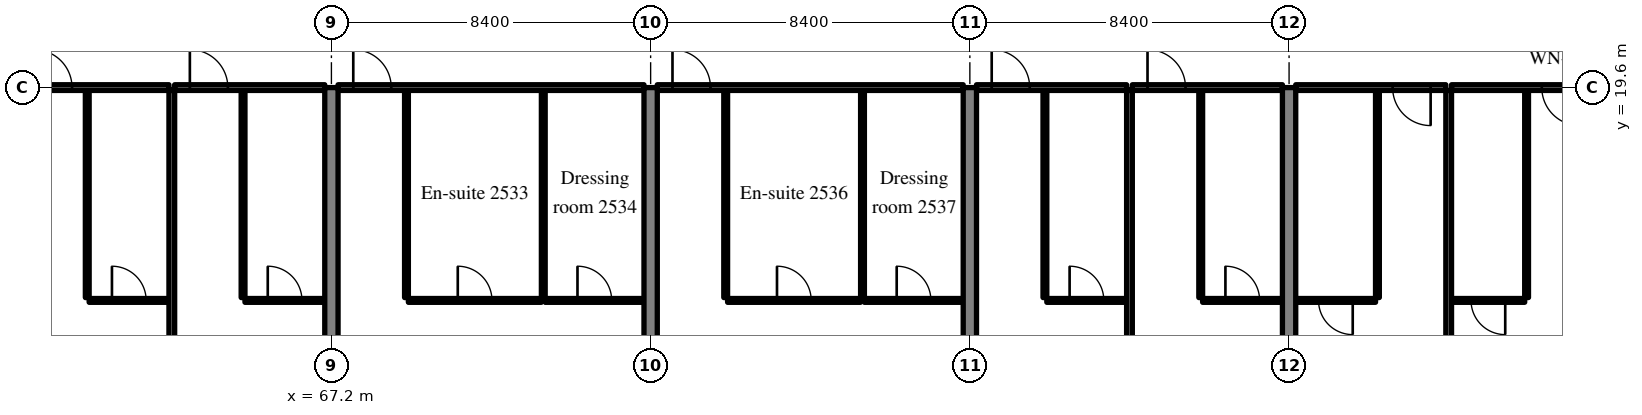
"""IFC4 building model, lengths in metres.
Left out: names, types, materials, properties, quantities, classifications, styles, units other than length and angle.
Written with IfcOpenShell. Run it as: python <this file> out.ifc"""

import sys

from ifc_helpers import new_model, si_unit, direction, frame, frame_2d, origin, place, context, subcontext, project, spatial, rectangle, extrude, source, transform, mapped, element, fill, save


model = new_model("IFC4")
c1 = context("Model", 3, precision=1e-05, world=origin(), true_north=direction((0.0, 1.0)))
c2 = subcontext(c1, "Body", "Model", "MODEL_VIEW")
j1 = project(units=[si_unit("LENGTHUNIT", "METRE"), si_unit("PLANEANGLEUNIT", "RADIAN")], contexts=[c1])
p1 = place(None, origin())
s1 = spatial("IfcSite", under=j1, at=p1, CompositionType="ELEMENT")
p2 = place(p1, origin())
s2 = spatial("IfcBuilding", under=s1, at=p2, CompositionType="ELEMENT")
p3 = place(p2, frame((0.0, 0.0, 106.6)))
s3 = spatial("IfcBuildingStorey", under=s2, at=p3, CompositionType="ELEMENT", Elevation=106.6)
m1 = source(origin(), c2, "Body", "SweptSolid", [
    extrude(rectangle(XDim=14.1, YDim=0.35, at=frame_2d((7.05, 0.0))), origin(), (0.0, 0.0, 1.0), 3.52),
])
for number, where, z_axis, x_axis in (
    (1, (67.2, 5.5, 0.0), (0.0, 0.0, 1.0), (0.0, 1.0, 0.0)),
    (2, (75.6, 5.5, 0.0), (0.0, 0.0, 1.0), (0.0, 1.0, 0.0)),
    (3, (84.0, 5.5, 0.0), (0.0, 0.0, 1.0), (0.0, 1.0, 0.0)),
    (4, (92.4, 5.5, 0.0), (0.0, 0.0, 1.0), (0.0, 1.0, 0.0)),
):
    element("IfcWall", number, at=place(p3, frame(where, z_axis=z_axis, x_axis=x_axis)), inside=s3, PredefinedType="SHEAR", context=c2, shape_type="MappedRepresentation", body=[
        mapped(m1, transform((0.0, 0.0, 0.0), scale=1.0)),
    ])
m2 = source(origin(), c2, "Body", "SweptSolid", [
    extrude(rectangle(XDim=5.45, YDim=0.1, at=frame_2d((2.725, 0.0))), origin(), (0.0, 0.0, 1.0), 3.52),
])
p4 = place(p3, frame((60.775, 14.075, 0.0), z_axis=(0.0, 0.0, 1.0), x_axis=(0.0, 1.0, 0.0)))
e5 = element("IfcWall", 5, at=p4, inside=s3, PredefinedType="PARTITIONING", context=c2, shape_type="MappedRepresentation", body=[
    mapped(m2, transform((0.0, 0.0, 0.0), scale=1.0)),
])
m3 = source(origin(), c2, "Body", "SweptSolid", [
    extrude(rectangle(XDim=2.1, YDim=0.1, at=frame_2d((1.05, 0.0))), origin(), (0.0, 0.0, 1.0), 3.52),
])
p5 = place(p3, frame((60.825, 14.0, 0.0), z_axis=(0.0, 0.0, 1.0), x_axis=(1.0, 0.0, 0.0)))
e6 = element("IfcWall", 6, at=p5, inside=s3, PredefinedType="PARTITIONING", context=c2, shape_type="MappedRepresentation", body=[
    mapped(m3, transform((0.0, 0.0, 0.0), scale=1.0)),
])
m4 = source(origin(), c2, "Body", "SweptSolid", [
    extrude(rectangle(XDim=0.9, YDim=2.1, at=frame_2d((0.45, 1.05))), frame((0.0, 0.06, 0.0), z_axis=(0.0, -1.0, 0.0), x_axis=(1.0, 0.0, 0.0)), (0.0, 0.0, 1.0), 0.12),
])
p6 = place(p5, frame((0.6, 0.0, 0.0)))
e7 = element("IfcOpeningElement", 7, at=p6, cuts=e6, PredefinedType="OPENING", context=c2, shape_type="MappedRepresentation", body=[
    mapped(m4, transform((0.0, 0.0, 0.0), scale=1.0)),
])
m5 = source(origin(), c2, "Body", "SweptSolid", [
    extrude(rectangle(XDim=3.95, YDim=0.15, at=frame_2d((1.975, 0.0))), origin(), (0.0, 0.0, 1.0), 2.82),
])
p7 = place(p3, frame((58.975, 19.6, 0.0), z_axis=(0.0, 0.0, 1.0), x_axis=(1.0, 0.0, 0.0)))
e8 = element("IfcWall", 8, at=p7, inside=s3, PredefinedType="PARTITIONING", context=c2, shape_type="MappedRepresentation", body=[
    mapped(m5, transform((0.0, 0.0, 0.0), scale=1.0)),
])
m6 = source(origin(), c2, "Body", "SweptSolid", [
    extrude(rectangle(XDim=1.0, YDim=2.1, at=frame_2d((0.5, 1.05))), frame((0.0, 0.085, 0.0), z_axis=(0.0, -1.0, 0.0), x_axis=(1.0, 0.0, 0.0)), (0.0, 0.0, 1.0), 0.17),
])
p8 = place(p7, frame((0.4, 0.0, 0.0)))
e9 = element("IfcOpeningElement", 9, at=p8, cuts=e8, PredefinedType="OPENING", context=c2, shape_type="MappedRepresentation", body=[
    mapped(m6, transform((0.0, 0.0, 0.0), scale=1.0)),
])
p9 = place(p3, frame((64.875, 14.075, 0.0), z_axis=(0.0, 0.0, 1.0), x_axis=(0.0, 1.0, 0.0)))
e10 = element("IfcWall", 10, at=p9, inside=s3, PredefinedType="PARTITIONING", context=c2, shape_type="MappedRepresentation", body=[
    mapped(m2, transform((0.0, 0.0, 0.0), scale=1.0)),
])
m7 = source(origin(), c2, "Body", "SweptSolid", [
    extrude(rectangle(XDim=2.1, YDim=0.1, at=frame_2d((1.05, 0.0))), origin(), (0.0, 0.0, 1.0), 3.52),
])
p10 = place(p3, frame((64.925, 14.0, 0.0), z_axis=(0.0, 0.0, 1.0), x_axis=(1.0, 0.0, 0.0)))
e11 = element("IfcWall", 11, at=p10, inside=s3, PredefinedType="PARTITIONING", context=c2, shape_type="MappedRepresentation", body=[
    mapped(m7, transform((0.0, 0.0, 0.0), scale=1.0)),
])
p11 = place(p10, frame((0.6, 0.0, 0.0)))
e12 = element("IfcOpeningElement", 12, at=p11, cuts=e11, PredefinedType="OPENING", context=c2, shape_type="MappedRepresentation", body=[
    mapped(m4, transform((0.0, 0.0, 0.0), scale=1.0)),
])
p12 = place(p3, frame((63.075, 19.6, 0.0), z_axis=(0.0, 0.0, 1.0), x_axis=(1.0, 0.0, 0.0)))
e13 = element("IfcWall", 13, at=p12, inside=s3, PredefinedType="PARTITIONING", context=c2, shape_type="MappedRepresentation", body=[
    mapped(m5, transform((0.0, 0.0, 0.0), scale=1.0)),
])
p13 = place(p12, frame((0.4, 0.0, 0.0)))
e14 = element("IfcOpeningElement", 14, at=p13, cuts=e13, PredefinedType="OPENING", context=c2, shape_type="MappedRepresentation", body=[
    mapped(m6, transform((0.0, 0.0, 0.0), scale=1.0)),
])
m8 = source(origin(), c2, "Body", "SweptSolid", [
    extrude(rectangle(XDim=15.498, YDim=0.15, at=frame_2d((7.749, 0.0))), origin(), (0.0, 0.0, 1.0), 3.52),
])
p14 = place(p3, frame((63.0, 4.027, 0.0), z_axis=(0.0, 0.0, 1.0), x_axis=(0.0, 1.0, 0.0)))
e15 = element("IfcWall", 15, at=p14, inside=s3, PredefinedType="PARTITIONING", context=c2, shape_type="MappedRepresentation", body=[
    mapped(m8, transform((0.0, 0.0, 0.0), scale=1.0)),
])
for number, where, z_axis, x_axis in (
    (16, (69.175, 14.075, 0.0), (0.0, 0.0, 1.0), (0.0, 1.0, 0.0)),
    (17, (72.775, 14.075, 0.0), (0.0, 0.0, 1.0), (0.0, 1.0, 0.0)),
):
    element("IfcWall", number, at=place(p3, frame(where, z_axis=z_axis, x_axis=x_axis)), inside=s3, PredefinedType="PARTITIONING", context=c2, shape_type="MappedRepresentation", body=[
        mapped(m2, transform((0.0, 0.0, 0.0), scale=1.0)),
    ])
m9 = source(origin(), c2, "Body", "SweptSolid", [
    extrude(rectangle(XDim=3.5, YDim=0.1, at=frame_2d((1.75, 0.0))), origin(), (0.0, 0.0, 1.0), 3.52),
])
p15 = place(p3, frame((69.225, 14.0, 0.0), z_axis=(0.0, 0.0, 1.0), x_axis=(1.0, 0.0, 0.0)))
e18 = element("IfcWall", 18, at=p15, inside=s3, PredefinedType="PARTITIONING", context=c2, shape_type="MappedRepresentation", body=[
    mapped(m9, transform((0.0, 0.0, 0.0), scale=1.0)),
])
p16 = place(p15, frame((1.3, 0.0, 0.0)))
e19 = element("IfcOpeningElement", 19, at=p16, cuts=e18, PredefinedType="OPENING", context=c2, shape_type="MappedRepresentation", body=[
    mapped(m4, transform((0.0, 0.0, 0.0), scale=1.0)),
])
m10 = source(origin(), c2, "Body", "SweptSolid", [
    extrude(rectangle(XDim=2.6, YDim=0.1, at=frame_2d((1.3, 0.0))), origin(), (0.0, 0.0, 1.0), 3.52),
])
p17 = place(p3, frame((72.825, 14.0, 0.0), z_axis=(0.0, 0.0, 1.0), x_axis=(1.0, 0.0, 0.0)))
e20 = element("IfcWall", 20, at=p17, inside=s3, PredefinedType="PARTITIONING", context=c2, shape_type="MappedRepresentation", body=[
    mapped(m10, transform((0.0, 0.0, 0.0), scale=1.0)),
])
p18 = place(p17, frame((0.85, 0.0, 0.0)))
e21 = element("IfcOpeningElement", 21, at=p18, cuts=e20, PredefinedType="OPENING", context=c2, shape_type="MappedRepresentation", body=[
    mapped(m4, transform((0.0, 0.0, 0.0), scale=1.0)),
])
m11 = source(origin(), c2, "Body", "SweptSolid", [
    extrude(rectangle(XDim=8.05, YDim=0.15, at=frame_2d((4.025, 0.0))), origin(), (0.0, 0.0, 1.0), 2.82),
])
p19 = place(p3, frame((67.375, 19.6, 0.0), z_axis=(0.0, 0.0, 1.0), x_axis=(1.0, 0.0, 0.0)))
e22 = element("IfcWall", 22, at=p19, inside=s3, PredefinedType="PARTITIONING", context=c2, shape_type="MappedRepresentation", body=[
    mapped(m11, transform((0.0, 0.0, 0.0), scale=1.0)),
])
p20 = place(p19, frame((0.4, 0.0, 0.0)))
e23 = element("IfcOpeningElement", 23, at=p20, cuts=e22, PredefinedType="OPENING", context=c2, shape_type="MappedRepresentation", body=[
    mapped(m6, transform((0.0, 0.0, 0.0), scale=1.0)),
])
for number, where, z_axis, x_axis in (
    (24, (77.575, 14.075, 0.0), (0.0, 0.0, 1.0), (0.0, 1.0, 0.0)),
    (25, (81.175, 14.075, 0.0), (0.0, 0.0, 1.0), (0.0, 1.0, 0.0)),
):
    element("IfcWall", number, at=place(p3, frame(where, z_axis=z_axis, x_axis=x_axis)), inside=s3, PredefinedType="PARTITIONING", context=c2, shape_type="MappedRepresentation", body=[
        mapped(m2, transform((0.0, 0.0, 0.0), scale=1.0)),
    ])
p21 = place(p3, frame((77.625, 14.0, 0.0), z_axis=(0.0, 0.0, 1.0), x_axis=(1.0, 0.0, 0.0)))
e26 = element("IfcWall", 26, at=p21, inside=s3, PredefinedType="PARTITIONING", context=c2, shape_type="MappedRepresentation", body=[
    mapped(m9, transform((0.0, 0.0, 0.0), scale=1.0)),
])
p22 = place(p21, frame((1.3, 0.0, 0.0)))
e27 = element("IfcOpeningElement", 27, at=p22, cuts=e26, PredefinedType="OPENING", context=c2, shape_type="MappedRepresentation", body=[
    mapped(m4, transform((0.0, 0.0, 0.0), scale=1.0)),
])
m12 = source(origin(), c2, "Body", "SweptSolid", [
    extrude(rectangle(XDim=2.6, YDim=0.1, at=frame_2d((1.3, 0.0))), origin(), (0.0, 0.0, 1.0), 3.52),
])
p23 = place(p3, frame((81.225, 14.0, 0.0), z_axis=(0.0, 0.0, 1.0), x_axis=(1.0, 0.0, 0.0)))
e28 = element("IfcWall", 28, at=p23, inside=s3, PredefinedType="PARTITIONING", context=c2, shape_type="MappedRepresentation", body=[
    mapped(m12, transform((0.0, 0.0, 0.0), scale=1.0)),
])
p24 = place(p23, frame((0.85, 0.0, 0.0)))
e29 = element("IfcOpeningElement", 29, at=p24, cuts=e28, PredefinedType="OPENING", context=c2, shape_type="MappedRepresentation", body=[
    mapped(m4, transform((0.0, 0.0, 0.0), scale=1.0)),
])
p25 = place(p3, frame((75.775, 19.6, 0.0), z_axis=(0.0, 0.0, 1.0), x_axis=(1.0, 0.0, 0.0)))
e30 = element("IfcWall", 30, at=p25, inside=s3, PredefinedType="PARTITIONING", context=c2, shape_type="MappedRepresentation", body=[
    mapped(m11, transform((0.0, 0.0, 0.0), scale=1.0)),
])
p26 = place(p25, frame((0.4, 0.0, 0.0)))
e31 = element("IfcOpeningElement", 31, at=p26, cuts=e30, PredefinedType="OPENING", context=c2, shape_type="MappedRepresentation", body=[
    mapped(m6, transform((0.0, 0.0, 0.0), scale=1.0)),
])
p27 = place(p3, frame((85.975, 14.075, 0.0), z_axis=(0.0, 0.0, 1.0), x_axis=(0.0, 1.0, 0.0)))
e32 = element("IfcWall", 32, at=p27, inside=s3, PredefinedType="PARTITIONING", context=c2, shape_type="MappedRepresentation", body=[
    mapped(m2, transform((0.0, 0.0, 0.0), scale=1.0)),
])
p28 = place(p3, frame((86.025, 14.0, 0.0), z_axis=(0.0, 0.0, 1.0), x_axis=(1.0, 0.0, 0.0)))
e33 = element("IfcWall", 33, at=p28, inside=s3, PredefinedType="PARTITIONING", context=c2, shape_type="MappedRepresentation", body=[
    mapped(m3, transform((0.0, 0.0, 0.0), scale=1.0)),
])
p29 = place(p28, frame((0.6, 0.0, 0.0)))
e34 = element("IfcOpeningElement", 34, at=p29, cuts=e33, PredefinedType="OPENING", context=c2, shape_type="MappedRepresentation", body=[
    mapped(m4, transform((0.0, 0.0, 0.0), scale=1.0)),
])
p30 = place(p3, frame((84.175, 19.6, 0.0), z_axis=(0.0, 0.0, 1.0), x_axis=(1.0, 0.0, 0.0)))
e35 = element("IfcWall", 35, at=p30, inside=s3, PredefinedType="PARTITIONING", context=c2, shape_type="MappedRepresentation", body=[
    mapped(m5, transform((0.0, 0.0, 0.0), scale=1.0)),
])
p31 = place(p30, frame((0.4, 0.0, 0.0)))
e36 = element("IfcOpeningElement", 36, at=p31, cuts=e35, PredefinedType="OPENING", context=c2, shape_type="MappedRepresentation", body=[
    mapped(m6, transform((0.0, 0.0, 0.0), scale=1.0)),
])
p32 = place(p3, frame((90.075, 14.075, 0.0), z_axis=(0.0, 0.0, 1.0), x_axis=(0.0, 1.0, 0.0)))
e37 = element("IfcWall", 37, at=p32, inside=s3, PredefinedType="PARTITIONING", context=c2, shape_type="MappedRepresentation", body=[
    mapped(m2, transform((0.0, 0.0, 0.0), scale=1.0)),
])
p33 = place(p3, frame((90.125, 14.0, 0.0), z_axis=(0.0, 0.0, 1.0), x_axis=(1.0, 0.0, 0.0)))
e38 = element("IfcWall", 38, at=p33, inside=s3, PredefinedType="PARTITIONING", context=c2, shape_type="MappedRepresentation", body=[
    mapped(m3, transform((0.0, 0.0, 0.0), scale=1.0)),
])
p34 = place(p33, frame((0.6, 0.0, 0.0)))
e39 = element("IfcOpeningElement", 39, at=p34, cuts=e38, PredefinedType="OPENING", context=c2, shape_type="MappedRepresentation", body=[
    mapped(m4, transform((0.0, 0.0, 0.0), scale=1.0)),
])
m13 = source(origin(), c2, "Body", "SweptSolid", [
    extrude(rectangle(XDim=3.95, YDim=0.15, at=frame_2d((1.975, 0.0))), origin(), (0.0, 0.0, 1.0), 2.82),
])
p35 = place(p3, frame((88.275, 19.6, 0.0), z_axis=(0.0, 0.0, 1.0), x_axis=(1.0, 0.0, 0.0)))
e40 = element("IfcWall", 40, at=p35, inside=s3, PredefinedType="PARTITIONING", context=c2, shape_type="MappedRepresentation", body=[
    mapped(m13, transform((0.0, 0.0, 0.0), scale=1.0)),
])
p36 = place(p35, frame((0.4, 0.0, 0.0)))
e41 = element("IfcOpeningElement", 41, at=p36, cuts=e40, PredefinedType="OPENING", context=c2, shape_type="MappedRepresentation", body=[
    mapped(m6, transform((0.0, 0.0, 0.0), scale=1.0)),
])
m14 = source(origin(), c2, "Body", "SweptSolid", [
    extrude(rectangle(XDim=12.275, YDim=0.15, at=frame_2d((6.137, 0.0))), origin(), (0.0, 0.0, 1.0), 3.52),
])
p37 = place(p3, frame((88.2, 7.25, 0.0), z_axis=(0.0, 0.0, 1.0), x_axis=(0.0, 1.0, 0.0)))
e42 = element("IfcWall", 42, at=p37, inside=s3, PredefinedType="PARTITIONING", context=c2, shape_type="MappedRepresentation", body=[
    mapped(m14, transform((0.0, 0.0, 0.0), scale=1.0)),
])
p38 = place(p3, frame((94.725, 14.075, 0.0), z_axis=(0.0, 0.0, 1.0), x_axis=(0.0, 1.0, 0.0)))
e43 = element("IfcWall", 43, at=p38, inside=s3, PredefinedType="PARTITIONING", context=c2, shape_type="MappedRepresentation", body=[
    mapped(m2, transform((0.0, 0.0, 0.0), scale=1.0)),
])
p39 = place(p3, frame((92.575, 14.0, 0.0), z_axis=(0.0, 0.0, 1.0), x_axis=(1.0, 0.0, 0.0)))
e44 = element("IfcWall", 44, at=p39, inside=s3, PredefinedType="PARTITIONING", context=c2, shape_type="MappedRepresentation", body=[
    mapped(m3, transform((0.0, 0.0, 0.0), scale=1.0)),
])
p40 = place(p39, frame((0.6, 0.0, 0.0)))
e45 = element("IfcOpeningElement", 45, at=p40, cuts=e44, PredefinedType="OPENING", context=c2, shape_type="MappedRepresentation", body=[
    mapped(m4, transform((0.0, 0.0, 0.0), scale=1.0)),
])
p41 = place(p3, frame((92.575, 19.6, 0.0), z_axis=(0.0, 0.0, 1.0), x_axis=(1.0, 0.0, 0.0)))
e46 = element("IfcWall", 46, at=p41, inside=s3, PredefinedType="PARTITIONING", context=c2, shape_type="MappedRepresentation", body=[
    mapped(m5, transform((0.0, 0.0, 0.0), scale=1.0)),
])
p42 = place(p41, frame((2.55, 0.0, 0.0)))
e47 = element("IfcOpeningElement", 47, at=p42, cuts=e46, PredefinedType="OPENING", context=c2, shape_type="MappedRepresentation", body=[
    mapped(m6, transform((0.0, 0.0, 0.0), scale=1.0)),
])
p43 = place(p3, frame((98.65, 14.075, 0.0), z_axis=(0.0, 0.0, 1.0), x_axis=(0.0, 1.0, 0.0)))
e48 = element("IfcWall", 48, at=p43, inside=s3, PredefinedType="PARTITIONING", context=c2, shape_type="MappedRepresentation", body=[
    mapped(m2, transform((0.0, 0.0, 0.0), scale=1.0)),
])
m15 = source(origin(), c2, "Body", "SweptSolid", [
    extrude(rectangle(XDim=1.925, YDim=0.1, at=frame_2d((0.962, 0.0))), origin(), (0.0, 0.0, 1.0), 3.52),
])
p44 = place(p3, frame((96.675, 14.0, 0.0), z_axis=(0.0, 0.0, 1.0), x_axis=(1.0, 0.0, 0.0)))
e49 = element("IfcWall", 49, at=p44, inside=s3, PredefinedType="PARTITIONING", context=c2, shape_type="MappedRepresentation", body=[
    mapped(m15, transform((0.0, 0.0, 0.0), scale=1.0)),
])
p45 = place(p44, frame((0.513, 0.0, 0.0)))
e50 = element("IfcOpeningElement", 50, at=p45, cuts=e49, PredefinedType="OPENING", context=c2, shape_type="MappedRepresentation", body=[
    mapped(m4, transform((0.0, 0.0, 0.0), scale=1.0)),
])
m16 = source(origin(), c2, "Body", "SweptSolid", [
    extrude(rectangle(XDim=3.775, YDim=0.15, at=frame_2d((1.887, 0.0))), origin(), (0.0, 0.0, 1.0), 2.82),
])
p46 = place(p3, frame((96.675, 19.6, 0.0), z_axis=(0.0, 0.0, 1.0), x_axis=(1.0, 0.0, 0.0)))
e51 = element("IfcWall", 51, at=p46, inside=s3, PredefinedType="PARTITIONING", context=c2, shape_type="MappedRepresentation", body=[
    mapped(m16, transform((0.0, 0.0, 0.0), scale=1.0)),
])
p47 = place(p46, frame((2.375, 0.0, 0.0)))
e52 = element("IfcOpeningElement", 52, at=p47, cuts=e51, PredefinedType="OPENING", context=c2, shape_type="MappedRepresentation", body=[
    mapped(m6, transform((0.0, 0.0, 0.0), scale=1.0)),
])
m17 = source(origin(), c2, "Body", "SweptSolid", [
    extrude(rectangle(XDim=13.447, YDim=0.15, at=frame_2d((6.724, 0.0))), origin(), (0.0, 0.0, 1.0), 3.52),
])
p48 = place(p3, frame((96.6, 6.078, 0.0), z_axis=(0.0, 0.0, 1.0), x_axis=(0.0, 1.0, 0.0)))
e53 = element("IfcWall", 53, at=p48, inside=s3, PredefinedType="PARTITIONING", context=c2, shape_type="MappedRepresentation", body=[
    mapped(m17, transform((0.0, 0.0, 0.0), scale=1.0)),
])
m18 = source(origin(), c2, "Body", "SweptSolid", [
    extrude(rectangle(XDim=0.9, YDim=2.1, at=frame_2d((0.45, 1.05))), frame((0.0, 0.025, 0.0), z_axis=(0.0, -1.0, 0.0), x_axis=(1.0, 0.0, 0.0)), (0.0, 0.0, 1.0), 0.05),
])
p49 = place(p6, origin())
e54 = element("IfcDoor", 54, at=p49, inside=s3, OperationType="SINGLE_SWING_LEFT", PredefinedType="DOOR", context=c2, shape_type="MappedRepresentation", body=[
    mapped(m18, transform((0.0, 0.0, 0.0), scale=1.0)),
])
fill(e7, e54)
m19 = source(origin(), c2, "Body", "SweptSolid", [
    extrude(rectangle(XDim=1.0, YDim=2.1, at=frame_2d((0.5, 1.05))), frame((0.0, 0.025, 0.0), z_axis=(0.0, -1.0, 0.0), x_axis=(1.0, 0.0, 0.0)), (0.0, 0.0, 1.0), 0.05),
])
p50 = place(p8, origin())
e55 = element("IfcDoor", 55, at=p50, inside=s3, OperationType="SINGLE_SWING_LEFT", PredefinedType="DOOR", context=c2, shape_type="MappedRepresentation", body=[
    mapped(m19, transform((0.0, 0.0, 0.0), scale=1.0)),
])
fill(e9, e55)
p51 = place(p11, origin())
e56 = element("IfcDoor", 56, at=p51, inside=s3, OperationType="SINGLE_SWING_LEFT", PredefinedType="DOOR", context=c2, shape_type="MappedRepresentation", body=[
    mapped(m18, transform((0.0, 0.0, 0.0), scale=1.0)),
])
fill(e12, e56)
p52 = place(p13, origin())
e57 = element("IfcDoor", 57, at=p52, inside=s3, OperationType="SINGLE_SWING_LEFT", PredefinedType="DOOR", context=c2, shape_type="MappedRepresentation", body=[
    mapped(m19, transform((0.0, 0.0, 0.0), scale=1.0)),
])
fill(e14, e57)
p53 = place(p16, origin())
e58 = element("IfcDoor", 58, at=p53, inside=s3, OperationType="SINGLE_SWING_LEFT", PredefinedType="DOOR", context=c2, shape_type="MappedRepresentation", body=[
    mapped(m18, transform((0.0, 0.0, 0.0), scale=1.0)),
])
fill(e19, e58)
p54 = place(p18, origin())
e59 = element("IfcDoor", 59, at=p54, inside=s3, OperationType="SINGLE_SWING_LEFT", PredefinedType="DOOR", context=c2, shape_type="MappedRepresentation", body=[
    mapped(m18, transform((0.0, 0.0, 0.0), scale=1.0)),
])
fill(e21, e59)
p55 = place(p20, origin())
e60 = element("IfcDoor", 60, at=p55, inside=s3, OperationType="SINGLE_SWING_LEFT", PredefinedType="DOOR", context=c2, shape_type="MappedRepresentation", body=[
    mapped(m19, transform((0.0, 0.0, 0.0), scale=1.0)),
])
fill(e23, e60)
p56 = place(p22, origin())
e61 = element("IfcDoor", 61, at=p56, inside=s3, OperationType="SINGLE_SWING_LEFT", PredefinedType="DOOR", context=c2, shape_type="MappedRepresentation", body=[
    mapped(m18, transform((0.0, 0.0, 0.0), scale=1.0)),
])
fill(e27, e61)
p57 = place(p24, origin())
e62 = element("IfcDoor", 62, at=p57, inside=s3, OperationType="SINGLE_SWING_LEFT", PredefinedType="DOOR", context=c2, shape_type="MappedRepresentation", body=[
    mapped(m18, transform((0.0, 0.0, 0.0), scale=1.0)),
])
fill(e29, e62)
p58 = place(p26, origin())
e63 = element("IfcDoor", 63, at=p58, inside=s3, OperationType="SINGLE_SWING_LEFT", PredefinedType="DOOR", context=c2, shape_type="MappedRepresentation", body=[
    mapped(m19, transform((0.0, 0.0, 0.0), scale=1.0)),
])
fill(e31, e63)
p59 = place(p29, origin())
e64 = element("IfcDoor", 64, at=p59, inside=s3, OperationType="SINGLE_SWING_LEFT", PredefinedType="DOOR", context=c2, shape_type="MappedRepresentation", body=[
    mapped(m18, transform((0.0, 0.0, 0.0), scale=1.0)),
])
fill(e34, e64)
p60 = place(p31, origin())
e65 = element("IfcDoor", 65, at=p60, inside=s3, OperationType="SINGLE_SWING_LEFT", PredefinedType="DOOR", context=c2, shape_type="MappedRepresentation", body=[
    mapped(m19, transform((0.0, 0.0, 0.0), scale=1.0)),
])
fill(e36, e65)
p61 = place(p34, origin())
e66 = element("IfcDoor", 66, at=p61, inside=s3, OperationType="SINGLE_SWING_LEFT", PredefinedType="DOOR", context=c2, shape_type="MappedRepresentation", body=[
    mapped(m18, transform((0.0, 0.0, 0.0), scale=1.0)),
])
fill(e39, e66)
p62 = place(p36, origin())
e67 = element("IfcDoor", 67, at=p62, inside=s3, OperationType="SINGLE_SWING_LEFT", PredefinedType="DOOR", context=c2, shape_type="MappedRepresentation", body=[
    mapped(m19, transform((0.0, 0.0, 0.0), scale=1.0)),
])
fill(e41, e67)
p63 = place(p40, origin())
e68 = element("IfcDoor", 68, at=p63, inside=s3, OperationType="SINGLE_SWING_RIGHT", PredefinedType="DOOR", context=c2, shape_type="MappedRepresentation", body=[
    mapped(m18, transform((0.0, 0.0, 0.0), scale=1.0)),
])
fill(e45, e68)
p64 = place(p42, origin())
e69 = element("IfcDoor", 69, at=p64, inside=s3, OperationType="SINGLE_SWING_RIGHT", PredefinedType="DOOR", context=c2, shape_type="MappedRepresentation", body=[
    mapped(m19, transform((0.0, 0.0, 0.0), scale=1.0)),
])
fill(e47, e69)
p65 = place(p45, origin())
e70 = element("IfcDoor", 70, at=p65, inside=s3, OperationType="SINGLE_SWING_RIGHT", PredefinedType="DOOR", context=c2, shape_type="MappedRepresentation", body=[
    mapped(m18, transform((0.0, 0.0, 0.0), scale=1.0)),
])
fill(e50, e70)
p66 = place(p47, origin())
e71 = element("IfcDoor", 71, at=p66, inside=s3, OperationType="SINGLE_SWING_RIGHT", PredefinedType="DOOR", context=c2, shape_type="MappedRepresentation", body=[
    mapped(m19, transform((0.0, 0.0, 0.0), scale=1.0)),
])
fill(e52, e71)
save(model, sys.argv[1])
